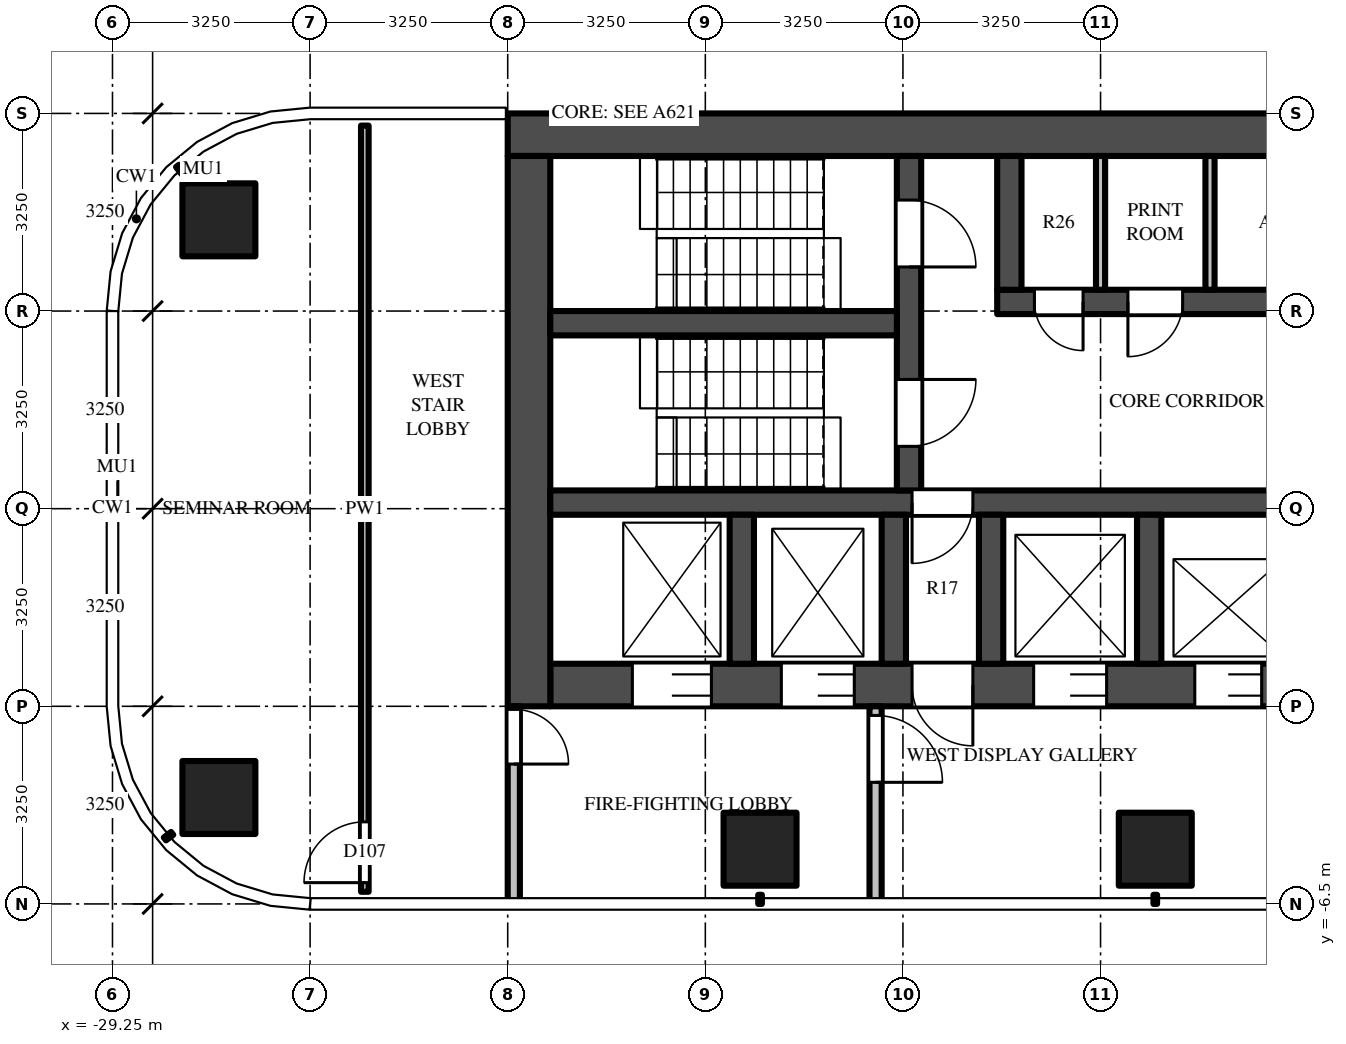
"""IFC4 building model, lengths in metres.
Left out: names, types, materials, properties, quantities, classifications, styles, units other than length and angle.
Written with IfcOpenShell. Run it as: python <this file> out.ifc"""

import sys

from ifc_helpers import new_model, si_unit, direction, frame, frame_2d, origin, origin_2d, place, context, subcontext, project, spatial, rectangle, extrude, source, transform, mapped, element, fill, save


model = new_model("IFC4")
c1 = context("Model", 3, precision=1e-05, world=origin(), true_north=direction((0.0, 1.0)))
c2 = subcontext(c1, "Body", "Model", "MODEL_VIEW")
j1 = project(units=[si_unit("LENGTHUNIT", "METRE"), si_unit("PLANEANGLEUNIT", "RADIAN")], contexts=[c1])
p1 = place(None, origin())
s1 = spatial("IfcSite", under=j1, at=p1, CompositionType="ELEMENT")
p2 = place(p1, origin())
s2 = spatial("IfcBuilding", under=s1, at=p2, CompositionType="ELEMENT")
p3 = place(p2, frame((0.0, 0.0, 177.6)))
s3 = spatial("IfcBuildingStorey", under=s2, at=p3, CompositionType="ELEMENT", Elevation=177.6)
m1 = source(origin(), c2, "Body", "SweptSolid", [
    extrude(rectangle(XDim=1.2, YDim=1.2, at=origin_2d()), origin(), (0.0, 0.0, 1.0), 3.9),
])
for number, where, z_axis, x_axis in (
    (1, (-12.1, -5.6, 0.0), (0.0, 0.0, 1.0), (1.0, 0.0, 0.0)),
    (2, (-18.6, -5.6, 0.0), (0.0, 0.0, 1.0), (1.0, 0.0, 0.0)),
    (3, (-27.5, -4.75, 0.0), (0.0, 0.0, 1.0), (1.0, 0.0, 0.0)),
    (4, (-27.5, 4.75, 0.0), (0.0, 0.0, 1.0), (1.0, 0.0, 0.0)),
):
    element("IfcColumn", number, at=place(p3, frame(where, z_axis=z_axis, x_axis=x_axis)), inside=s3, PredefinedType="COLUMN", context=c2, shape_type="MappedRepresentation", body=[
        mapped(m1, transform((0.0, 0.0, 0.0))),
    ])
m2 = source(origin(), c2, "Body", "SweptSolid", [
    extrude(rectangle(XDim=16.55, YDim=0.7, at=frame_2d((8.275, 0.0))), origin(), (0.0, 0.0, 1.0), 3.7),
])
p4 = place(p3, frame((-6.2, 6.15, 0.0), z_axis=(0.0, 0.0, 1.0), x_axis=(-1.0, 0.0, 0.0)))
e5 = element("IfcWall", 5, at=p4, inside=s3, PredefinedType="SHEAR", context=c2, shape_type="MappedRepresentation", body=[
    mapped(m2, transform((0.0, 0.0, 0.0))),
])
m3 = source(origin(), c2, "Body", "SweptSolid", [
    extrude(rectangle(XDim=14.85, YDim=0.7, at=frame_2d((7.425, 0.0))), origin(), (0.0, 0.0, 1.0), 3.7),
])
p5 = place(p3, frame((-7.2, -2.9, 0.0), z_axis=(0.0, 0.0, 1.0), x_axis=(-1.0, 0.0, 0.0)))
e6 = element("IfcWall", 6, at=p5, inside=s3, PredefinedType="SHEAR", context=c2, shape_type="MappedRepresentation", body=[
    mapped(m3, transform((0.0, 0.0, 0.0))),
])
m4 = source(origin(), c2, "Body", "SweptSolid", [
    extrude(rectangle(XDim=1.1, YDim=2.1, at=frame_2d((0.55, 1.05))), frame((0.0, 0.36, 0.0), z_axis=(0.0, -1.0, 0.0), x_axis=(1.0, 0.0, 0.0)), (0.0, 0.0, 1.0), 0.72),
])
p6 = place(p5, frame((0.55, 0.0, 0.0)))
e7 = element("IfcOpeningElement", 7, at=p6, cuts=e6, PredefinedType="OPENING", context=c2, shape_type="MappedRepresentation", body=[
    mapped(m4, transform((0.0, 0.0, 0.0))),
])
p7 = place(p5, frame((3.15, 0.0, 0.0)))
e8 = element("IfcOpeningElement", 8, at=p7, cuts=e6, PredefinedType="OPENING", context=c2, shape_type="MappedRepresentation", body=[
    mapped(m4, transform((0.0, 0.0, 0.0))),
])
m5 = source(origin(), c2, "Body", "SweptSolid", [
    extrude(rectangle(XDim=1.2, YDim=2.1, at=frame_2d((0.6, 1.05))), frame((0.0, 0.36, 0.0), z_axis=(0.0, -1.0, 0.0), x_axis=(1.0, 0.0, 0.0)), (0.0, 0.0, 1.0), 0.72),
])
p8 = place(p5, frame((5.7, 0.0, 0.0)))
e9 = element("IfcOpeningElement", 9, at=p8, cuts=e6, PredefinedType="OPENING", context=c2, shape_type="MappedRepresentation", body=[
    mapped(m5, transform((0.0, 0.0, 0.0))),
])
m6 = source(origin(), c2, "Body", "SweptSolid", [
    extrude(rectangle(XDim=1.3, YDim=2.1, at=frame_2d((0.65, 1.05))), frame((0.0, 0.36, 0.0), z_axis=(0.0, -1.0, 0.0), x_axis=(1.0, 0.0, 0.0)), (0.0, 0.0, 1.0), 0.72),
])
p9 = place(p5, frame((12.2, 0.0, 0.0)))
e10 = element("IfcOpeningElement", 10, at=p9, cuts=e6, PredefinedType="OPENING", context=c2, shape_type="MappedRepresentation", body=[
    mapped(m6, transform((0.0, 0.0, 0.0))),
])
p10 = place(p5, frame((9.85, 0.0, 0.0)))
e11 = element("IfcOpeningElement", 11, at=p10, cuts=e6, PredefinedType="OPENING", context=c2, shape_type="MappedRepresentation", body=[
    mapped(m5, transform((0.0, 0.0, 0.0))),
])
m7 = source(origin(), c2, "Body", "SweptSolid", [
    extrude(rectangle(XDim=1.0, YDim=2.1, at=frame_2d((0.5, 1.05))), frame((0.0, 0.36, 0.0), z_axis=(0.0, -1.0, 0.0), x_axis=(1.0, 0.0, 0.0)), (0.0, 0.0, 1.0), 0.72),
])
p11 = place(p5, frame((7.9, 0.0, 0.0)))
e12 = element("IfcOpeningElement", 12, at=p11, cuts=e6, PredefinedType="OPENING", context=c2, shape_type="MappedRepresentation", body=[
    mapped(m7, transform((0.0, 0.0, 0.0))),
])
m8 = source(origin(), c2, "Body", "SweptSolid", [
    extrude(rectangle(XDim=9.05, YDim=0.7, at=frame_2d((4.525, 0.0))), origin(), (0.0, 0.0, 1.0), 3.7),
])
p12 = place(p3, frame((-22.4, 5.8, 0.0), z_axis=(0.0, 0.0, 1.0), x_axis=(0.0, -1.0, 0.0)))
e13 = element("IfcWall", 13, at=p12, inside=s3, PredefinedType="SHEAR", context=c2, shape_type="MappedRepresentation", body=[
    mapped(m8, transform((0.0, 0.0, 0.0))),
])
m9 = source(origin(), c2, "Body", "SweptSolid", [
    extrude(rectangle(XDim=7.5, YDim=0.4, at=frame_2d((3.75, 0.0))), origin(), (0.0, 0.0, 1.0), 3.7),
])
p13 = place(p3, frame((-7.2, 3.4, 0.0), z_axis=(0.0, 0.0, 1.0), x_axis=(-1.0, 0.0, 0.0)))
e14 = element("IfcWall", 14, at=p13, inside=s3, PredefinedType="SHEAR", context=c2, shape_type="MappedRepresentation", body=[
    mapped(m9, transform((0.0, 0.0, 0.0))),
])
m10 = source(origin(), c2, "Body", "SweptSolid", [
    extrude(rectangle(XDim=1.0, YDim=2.1, at=frame_2d((0.5, 1.05))), frame((0.0, 0.21, 0.0), z_axis=(0.0, -1.0, 0.0), x_axis=(1.0, 0.0, 0.0)), (0.0, 0.0, 1.0), 0.42),
])
p14 = place(p13, frame((1.462, 0.0, 0.0)))
e15 = element("IfcOpeningElement", 15, at=p14, cuts=e14, PredefinedType="OPENING", context=c2, shape_type="MappedRepresentation", body=[
    mapped(m10, transform((0.0, 0.0, 0.0))),
])
m11 = source(origin(), c2, "Body", "SweptSolid", [
    extrude(rectangle(XDim=0.9, YDim=2.1, at=frame_2d((0.45, 1.05))), frame((0.0, 0.21, 0.0), z_axis=(0.0, -1.0, 0.0), x_axis=(1.0, 0.0, 0.0)), (0.0, 0.0, 1.0), 0.42),
])
p15 = place(p13, frame((4.45, 0.0, 0.0)))
e16 = element("IfcOpeningElement", 16, at=p15, cuts=e14, PredefinedType="OPENING", context=c2, shape_type="MappedRepresentation", body=[
    mapped(m11, transform((0.0, 0.0, 0.0))),
])
m12 = source(origin(), c2, "Body", "SweptSolid", [
    extrude(rectangle(XDim=0.8, YDim=2.1, at=frame_2d((0.4, 1.05))), frame((0.0, 0.21, 0.0), z_axis=(0.0, -1.0, 0.0), x_axis=(1.0, 0.0, 0.0)), (0.0, 0.0, 1.0), 0.42),
])
p16 = place(p13, frame((6.087, 0.0, 0.0)))
e17 = element("IfcOpeningElement", 17, at=p16, cuts=e14, PredefinedType="OPENING", context=c2, shape_type="MappedRepresentation", body=[
    mapped(m12, transform((0.0, 0.0, 0.0))),
])
m13 = source(origin(), c2, "Body", "SweptSolid", [
    extrude(rectangle(XDim=14.85, YDim=0.4, at=frame_2d((7.425, 0.0))), origin(), (0.0, 0.0, 1.0), 3.7),
])
p17 = place(p3, frame((-7.2, 0.1, 0.0), z_axis=(0.0, 0.0, 1.0), x_axis=(-1.0, 0.0, 0.0)))
e18 = element("IfcWall", 18, at=p17, inside=s3, PredefinedType="SHEAR", context=c2, shape_type="MappedRepresentation", body=[
    mapped(m13, transform((0.0, 0.0, 0.0))),
])
p18 = place(p17, frame((7.9, 0.0, 0.0)))
e19 = element("IfcOpeningElement", 19, at=p18, cuts=e18, PredefinedType="OPENING", context=c2, shape_type="MappedRepresentation", body=[
    mapped(m10, transform((0.0, 0.0, 0.0))),
])
m14 = source(origin(), c2, "Body", "SweptSolid", [
    extrude(rectangle(XDim=5.5, YDim=0.4, at=frame_2d((2.75, 0.0))), origin(), (0.0, 0.0, 1.0), 3.7),
])
p19 = place(p3, frame((-16.15, 5.8, 0.0), z_axis=(0.0, 0.0, 1.0), x_axis=(0.0, -1.0, 0.0)))
e20 = element("IfcWall", 20, at=p19, inside=s3, PredefinedType="SHEAR", context=c2, shape_type="MappedRepresentation", body=[
    mapped(m14, transform((0.0, 0.0, 0.0))),
])
m15 = source(origin(), c2, "Body", "SweptSolid", [
    extrude(rectangle(XDim=1.1, YDim=2.1, at=frame_2d((0.55, 1.05))), frame((0.0, 0.21, 0.0), z_axis=(0.0, -1.0, 0.0), x_axis=(1.0, 0.0, 0.0)), (0.0, 0.0, 1.0), 0.42),
])
p20 = place(p19, frame((0.725, 0.0, 0.0)))
e21 = element("IfcOpeningElement", 21, at=p20, cuts=e20, PredefinedType="OPENING", context=c2, shape_type="MappedRepresentation", body=[
    mapped(m15, transform((0.0, 0.0, 0.0))),
])
p21 = place(p19, frame((3.675, 0.0, 0.0)))
e22 = element("IfcOpeningElement", 22, at=p21, cuts=e20, PredefinedType="OPENING", context=c2, shape_type="MappedRepresentation", body=[
    mapped(m15, transform((0.0, 0.0, 0.0))),
])
m16 = source(origin(), c2, "Body", "SweptSolid", [
    extrude(rectangle(XDim=5.7, YDim=0.4, at=frame_2d((2.85, 0.0))), origin(), (0.0, 0.0, 1.0), 3.7),
])
p22 = place(p3, frame((-16.35, 3.05, 0.0), z_axis=(0.0, 0.0, 1.0), x_axis=(-1.0, 0.0, 0.0)))
e23 = element("IfcWall", 23, at=p22, inside=s3, PredefinedType="SHEAR", context=c2, shape_type="MappedRepresentation", body=[
    mapped(m16, transform((0.0, 0.0, 0.0))),
])
m17 = source(origin(), c2, "Body", "SweptSolid", [
    extrude(rectangle(XDim=2.2, YDim=0.4, at=frame_2d((1.1, 0.0))), origin(), (0.0, 0.0, 1.0), 3.7),
])
p23 = place(p3, frame((-14.5, 5.8, 0.0), z_axis=(0.0, 0.0, 1.0), x_axis=(0.0, -1.0, 0.0)))
e24 = element("IfcWall", 24, at=p23, inside=s3, PredefinedType="SHEAR", context=c2, shape_type="MappedRepresentation", body=[
    mapped(m17, transform((0.0, 0.0, 0.0))),
])
m18 = source(origin(), c2, "Body", "SweptSolid", [
    extrude(rectangle(XDim=2.45, YDim=0.4, at=frame_2d((1.225, 0.0))), origin(), (0.0, 0.0, 1.0), 3.7),
])
for number, where, z_axis, x_axis in (
    (25, (-12.2, -0.1, 0.0), (0.0, 0.0, 1.0), (0.0, -1.0, 0.0)),
    (26, (-14.8, -0.1, 0.0), (0.0, 0.0, 1.0), (0.0, -1.0, 0.0)),
    (27, (-16.4, -0.1, 0.0), (0.0, 0.0, 1.0), (0.0, -1.0, 0.0)),
    (28, (-18.9, -0.1, 0.0), (0.0, 0.0, 1.0), (0.0, -1.0, 0.0)),
):
    element("IfcWall", number, at=place(p3, frame(where, z_axis=z_axis, x_axis=x_axis)), inside=s3, PredefinedType="SHEAR", context=c2, shape_type="MappedRepresentation", body=[
        mapped(m18, transform((0.0, 0.0, 0.0))),
    ])
m19 = source(origin(), c2, "Body", "SweptSolid", [
    extrude(rectangle(XDim=3.25, YDim=0.2, at=frame_2d((1.625, 0.0))), origin(), (0.0, 0.0, 1.0), 3.7),
])
p24 = place(p3, frame((-16.7, -3.25, 0.0), z_axis=(0.0, 0.0, 1.0), x_axis=(0.0, -1.0, 0.0)))
e29 = element("IfcWall", 29, at=p24, inside=s3, PredefinedType="PARTITIONING", context=c2, shape_type="MappedRepresentation", body=[
    mapped(m19, transform((0.0, 0.0, 0.0))),
])
m20 = source(origin(), c2, "Body", "SweptSolid", [
    extrude(rectangle(XDim=1.1, YDim=2.1, at=frame_2d((0.55, 1.05))), frame((0.0, 0.11, 0.0), z_axis=(0.0, -1.0, 0.0), x_axis=(1.0, 0.0, 0.0)), (0.0, 0.0, 1.0), 0.22),
])
p25 = place(p24, frame((0.15, 0.0, 0.0)))
e30 = element("IfcOpeningElement", 30, at=p25, cuts=e29, PredefinedType="OPENING", context=c2, shape_type="MappedRepresentation", body=[
    mapped(m20, transform((0.0, 0.0, 0.0))),
])
p26 = place(p3, frame((-22.65, -3.25, 0.0), z_axis=(0.0, 0.0, 1.0), x_axis=(0.0, -1.0, 0.0)))
e31 = element("IfcWall", 31, at=p26, inside=s3, PredefinedType="PARTITIONING", context=c2, shape_type="MappedRepresentation", body=[
    mapped(m19, transform((0.0, 0.0, 0.0))),
])
m21 = source(origin(), c2, "Body", "SweptSolid", [
    extrude(rectangle(XDim=0.9, YDim=2.1, at=frame_2d((0.45, 1.05))), frame((0.0, 0.11, 0.0), z_axis=(0.0, -1.0, 0.0), x_axis=(1.0, 0.0, 0.0)), (0.0, 0.0, 1.0), 0.22),
])
p27 = place(p26, frame((0.05, 0.0, 0.0)))
e32 = element("IfcOpeningElement", 32, at=p27, cuts=e31, PredefinedType="OPENING", context=c2, shape_type="MappedRepresentation", body=[
    mapped(m21, transform((0.0, 0.0, 0.0))),
])
m22 = source(origin(), c2, "Body", "SweptSolid", [
    extrude(rectangle(XDim=2.2, YDim=0.15, at=frame_2d((1.1, 0.0))), origin(), (0.0, 0.0, 1.0), 3.7),
])
for number, where, z_axis, x_axis in (
    (33, (-11.2, 5.8, 0.0), (0.0, 0.0, 1.0), (0.0, -1.0, 0.0)),
    (34, (-13.0, 5.8, 0.0), (0.0, 0.0, 1.0), (0.0, -1.0, 0.0)),
):
    element("IfcWall", number, at=place(p3, frame(where, z_axis=z_axis, x_axis=x_axis)), inside=s3, PredefinedType="PARTITIONING", context=c2, shape_type="MappedRepresentation", body=[
        mapped(m22, transform((0.0, 0.0, 0.0))),
    ])
m23 = source(origin(), c2, "Body", "SweptSolid", [
    extrude(rectangle(XDim=12.6, YDim=0.125, at=frame_2d((6.3, 0.0))), origin(), (0.0, 0.0, 1.0), 2.78),
])
p28 = place(p3, frame((-25.1, -6.3, 0.0), z_axis=(0.0, 0.0, 1.0), x_axis=(0.0, 1.0, 0.0)))
e35 = element("IfcWall", 35, at=p28, inside=s3, PredefinedType="PARTITIONING", context=c2, shape_type="MappedRepresentation", body=[
    mapped(m23, transform((0.0, 0.0, 0.0))),
])
m24 = source(origin(), c2, "Body", "SweptSolid", [
    extrude(rectangle(XDim=1.0, YDim=2.1, at=frame_2d((0.5, 1.05))), frame((0.0, 0.073, 0.0), z_axis=(0.0, -1.0, 0.0), x_axis=(1.0, 0.0, 0.0)), (0.0, 0.0, 1.0), 0.145),
])
p29 = place(p28, frame((0.15, 0.0, 0.0)))
e36 = element("IfcOpeningElement", 36, at=p29, cuts=e35, PredefinedType="OPENING", context=c2, shape_type="MappedRepresentation", body=[
    mapped(m24, transform((0.0, 0.0, 0.0))),
])
m25 = source(origin(), c2, "Body", "SweptSolid", [
    extrude(rectangle(XDim=1.1, YDim=2.1, at=frame_2d((0.55, 1.05))), frame((0.0, -0.275, 0.0), z_axis=(0.0, -1.0, 0.0), x_axis=(1.0, 0.0, 0.0)), (0.0, 0.0, 1.0), 0.05),
])
p30 = place(p7, origin())
e37 = element("IfcDoor", 37, at=p30, inside=s3, OperationType="DOUBLE_DOOR_SLIDING", PredefinedType="DOOR", context=c2, shape_type="MappedRepresentation", body=[
    mapped(m25, transform((0.0, 0.0, 0.0))),
])
fill(e8, e37)
m26 = source(origin(), c2, "Body", "SweptSolid", [
    extrude(rectangle(XDim=1.2, YDim=2.1, at=frame_2d((0.6, 1.05))), frame((0.0, -0.275, 0.0), z_axis=(0.0, -1.0, 0.0), x_axis=(1.0, 0.0, 0.0)), (0.0, 0.0, 1.0), 0.05),
])
p31 = place(p8, origin())
e38 = element("IfcDoor", 38, at=p31, inside=s3, OperationType="DOUBLE_DOOR_SLIDING", PredefinedType="DOOR", context=c2, shape_type="MappedRepresentation", body=[
    mapped(m26, transform((0.0, 0.0, 0.0))),
])
fill(e9, e38)
m27 = source(origin(), c2, "Body", "SweptSolid", [
    extrude(rectangle(XDim=1.3, YDim=2.1, at=frame_2d((0.65, 1.05))), frame((0.0, -0.275, 0.0), z_axis=(0.0, -1.0, 0.0), x_axis=(1.0, 0.0, 0.0)), (0.0, 0.0, 1.0), 0.05),
])
p32 = place(p9, origin())
e39 = element("IfcDoor", 39, at=p32, inside=s3, OperationType="DOUBLE_DOOR_SLIDING", PredefinedType="DOOR", context=c2, shape_type="MappedRepresentation", body=[
    mapped(m27, transform((0.0, 0.0, 0.0))),
])
fill(e10, e39)
p33 = place(p10, origin())
e40 = element("IfcDoor", 40, at=p33, inside=s3, OperationType="DOUBLE_DOOR_SLIDING", PredefinedType="DOOR", context=c2, shape_type="MappedRepresentation", body=[
    mapped(m26, transform((0.0, 0.0, 0.0))),
])
fill(e11, e40)
m28 = source(origin(), c2, "Body", "SweptSolid", [
    extrude(rectangle(XDim=1.1, YDim=2.1, at=frame_2d((0.55, 1.05))), frame((0.0, 0.025, 0.0), z_axis=(0.0, -1.0, 0.0), x_axis=(1.0, 0.0, 0.0)), (0.0, 0.0, 1.0), 0.05),
])
p34 = place(p20, origin())
e41 = element("IfcDoor", 41, at=p34, inside=s3, OperationType="SINGLE_SWING_RIGHT", PredefinedType="DOOR", context=c2, shape_type="MappedRepresentation", body=[
    mapped(m28, transform((0.0, 0.0, 0.0))),
])
fill(e21, e41)
p35 = place(p21, origin())
e42 = element("IfcDoor", 42, at=p35, inside=s3, OperationType="SINGLE_SWING_LEFT", PredefinedType="DOOR", context=c2, shape_type="MappedRepresentation", body=[
    mapped(m28, transform((0.0, 0.0, 0.0))),
])
fill(e22, e42)
m29 = source(origin(), c2, "Body", "SweptSolid", [
    extrude(rectangle(XDim=1.0, YDim=2.1, at=frame_2d((0.5, 1.05))), frame((0.0, 0.025, 0.0), z_axis=(0.0, -1.0, 0.0), x_axis=(1.0, 0.0, 0.0)), (0.0, 0.0, 1.0), 0.05),
])
p36 = place(p18, origin())
e43 = element("IfcDoor", 43, at=p36, inside=s3, OperationType="SINGLE_SWING_RIGHT", PredefinedType="DOOR", context=c2, shape_type="MappedRepresentation", body=[
    mapped(m29, transform((0.0, 0.0, 0.0))),
])
fill(e19, e43)
m30 = source(origin(), c2, "Body", "SweptSolid", [
    extrude(rectangle(XDim=1.0, YDim=2.1, at=frame_2d((0.5, 1.05))), frame((0.0, -0.275, 0.0), z_axis=(0.0, -1.0, 0.0), x_axis=(1.0, 0.0, 0.0)), (0.0, 0.0, 1.0), 0.05),
])
p37 = place(p11, origin())
e44 = element("IfcDoor", 44, at=p37, inside=s3, OperationType="SINGLE_SWING_LEFT", PredefinedType="DOOR", context=c2, shape_type="MappedRepresentation", body=[
    mapped(m30, transform((0.0, 0.0, 0.0))),
])
fill(e12, e44)
p38 = place(p25, origin())
e45 = element("IfcDoor", 45, at=p38, inside=s3, OperationType="SINGLE_SWING_RIGHT", PredefinedType="DOOR", context=c2, shape_type="MappedRepresentation", body=[
    mapped(m28, transform((0.0, 0.0, 0.0))),
])
fill(e30, e45)
m31 = source(origin(), c2, "Body", "SweptSolid", [
    extrude(rectangle(XDim=0.9, YDim=2.1, at=frame_2d((0.45, 1.05))), frame((0.0, 0.025, 0.0), z_axis=(0.0, -1.0, 0.0), x_axis=(1.0, 0.0, 0.0)), (0.0, 0.0, 1.0), 0.05),
])
p39 = place(p27, origin())
e46 = element("IfcDoor", 46, at=p39, inside=s3, OperationType="SINGLE_SWING_RIGHT", PredefinedType="DOOR", context=c2, shape_type="MappedRepresentation", body=[
    mapped(m31, transform((0.0, 0.0, 0.0))),
])
fill(e32, e46)
p40 = place(p15, origin())
e47 = element("IfcDoor", 47, at=p40, inside=s3, OperationType="SINGLE_SWING_RIGHT", PredefinedType="DOOR", context=c2, shape_type="MappedRepresentation", body=[
    mapped(m31, transform((0.0, 0.0, 0.0))),
])
fill(e16, e47)
m32 = source(origin(), c2, "Body", "SweptSolid", [
    extrude(rectangle(XDim=0.8, YDim=2.1, at=frame_2d((0.4, 1.05))), frame((0.0, 0.025, 0.0), z_axis=(0.0, -1.0, 0.0), x_axis=(1.0, 0.0, 0.0)), (0.0, 0.0, 1.0), 0.05),
])
p41 = place(p16, origin())
e48 = element("IfcDoor", 48, at=p41, inside=s3, OperationType="SINGLE_SWING_LEFT", PredefinedType="DOOR", context=c2, shape_type="MappedRepresentation", body=[
    mapped(m32, transform((0.0, 0.0, 0.0))),
])
fill(e17, e48)
p42 = place(p29, origin())
e49 = element("IfcDoor", 49, at=p42, inside=s3, OperationType="SINGLE_SWING_LEFT", PredefinedType="DOOR", context=c2, shape_type="MappedRepresentation", body=[
    mapped(m29, transform((0.0, 0.0, 0.0))),
])
fill(e36, e49)
save(model, sys.argv[1])
